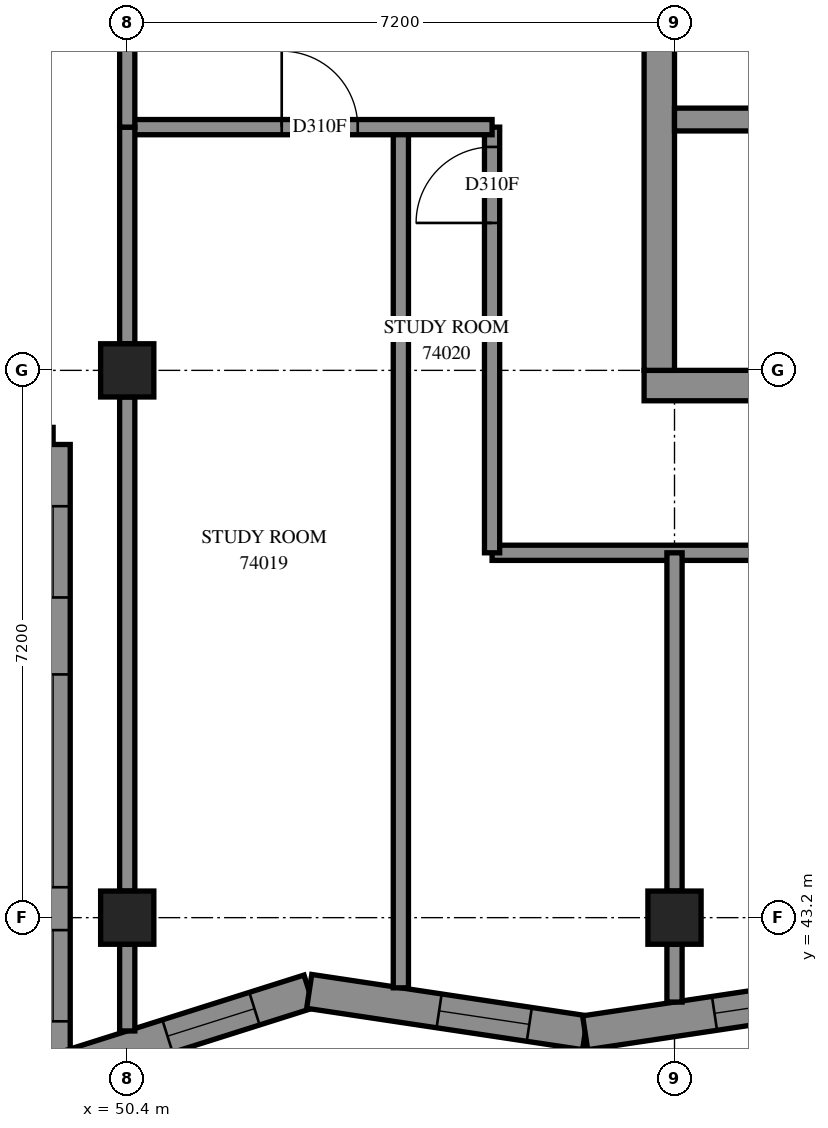
"""IFC4 building model, lengths in metres.
Left out: names, types, materials, properties, quantities, classifications, styles, units other than length and angle.
Written with IfcOpenShell. Run it as: python <this file> out.ifc"""

import sys

from ifc_helpers import new_model, si_unit, direction, frame, frame_2d, origin, origin_2d, place, context, subcontext, project, spatial, polyline, rectangle, outline, extrude, element, fill, save


model = new_model("IFC4")
c1 = context("Model", 3, precision=1e-05, world=origin(), true_north=direction((0.0, 1.0)))
c2 = subcontext(c1, "Body", "Model", "MODEL_VIEW")
j1 = project(units=[si_unit("LENGTHUNIT", "METRE"), si_unit("PLANEANGLEUNIT", "RADIAN")], contexts=[c1])
p1 = place(None, origin())
s1 = spatial("IfcSite", under=j1, at=p1, CompositionType="ELEMENT")
p2 = place(p1, origin())
s2 = spatial("IfcBuilding", under=s1, at=p2, CompositionType="ELEMENT")
p3 = place(p2, frame((0.0, 0.0, 271.0)))
s3 = spatial("IfcBuildingStorey", under=s2, at=p3, CompositionType="ELEMENT", Elevation=271.0)
for number, where, z_axis, x_axis in (
    (1, (50.4, 43.2, 0.0), (0.0, 0.0, 1.0), (1.0, 0.0, 0.0)),
    (2, (50.4, 50.4, 0.0), (0.0, 0.0, 1.0), (1.0, 0.0, 0.0)),
    (3, (57.6, 43.2, 0.0), (0.0, 0.0, 1.0), (1.0, 0.0, 0.0)),
):
    element("IfcColumn", number, at=place(p3, frame(where, z_axis=z_axis, x_axis=x_axis)), inside=s3, PredefinedType="COLUMN", context=c2, shape_type="SweptSolid", body=[
        extrude(rectangle(XDim=0.7, YDim=0.7, at=origin_2d()), origin(), (0.0, 0.0, 1.0), 3.1),
    ])
p4 = place(p3, frame((57.2, 50.2, -0.3), z_axis=(0.0, 0.0, 1.0), x_axis=(1.0, 0.0, 0.0)))
e4 = element("IfcWall", 4, at=p4, inside=s3, PredefinedType="SHEAR", context=c2, shape_type="SweptSolid", body=[
    extrude(rectangle(XDim=15.2, YDim=0.4, at=frame_2d((7.6, 0.0))), origin(), (0.0, 0.0, 1.0), 2.7),
])
p5 = place(p3, frame((57.4, 50.4, -0.3), z_axis=(0.0, 0.0, 1.0), x_axis=(0.0, 1.0, 0.0)))
e5 = element("IfcWall", 5, at=p5, inside=s3, PredefinedType="SHEAR", context=c2, shape_type="SweptSolid", body=[
    extrude(rectangle(XDim=14.4, YDim=0.4, at=frame_2d((7.2, 0.0))), origin(), (0.0, 0.0, 1.0), 2.7),
])
p6 = place(p5, frame((4.55, 0.0, 0.3)))
e6 = element("IfcOpeningElement", 6, at=p6, cuts=e5, PredefinedType="OPENING", context=c2, shape_type="SweptSolid", body=[
    extrude(rectangle(XDim=1.1, YDim=2.1, at=frame_2d((0.55, 1.05))), frame((0.0, 0.21, 0.0), z_axis=(0.0, -1.0, 0.0), x_axis=(1.0, 0.0, 0.0)), (0.0, 0.0, 1.0), 0.42),
])
p7 = place(p5, frame((11.35, 0.0, 0.3)))
e7 = element("IfcOpeningElement", 7, at=p7, cuts=e5, PredefinedType="OPENING", context=c2, shape_type="SweptSolid", body=[
    extrude(rectangle(XDim=1.1, YDim=2.1, at=frame_2d((0.55, 1.05))), frame((0.0, 0.21, 0.0), z_axis=(0.0, -1.0, 0.0), x_axis=(1.0, 0.0, 0.0)), (0.0, 0.0, 1.0), 0.42),
])
p8 = place(p3, frame((57.6, 53.7, 0.0), z_axis=(0.0, 0.0, 1.0), x_axis=(1.0, 0.0, 0.0)))
e8 = element("IfcWall", 8, at=p8, inside=s3, PredefinedType="SOLIDWALL", context=c2, shape_type="SweptSolid", body=[
    extrude(rectangle(XDim=14.4, YDim=0.3, at=frame_2d((7.2, 0.0))), origin(), (0.0, 0.0, 1.0), 3.1),
])
p9 = place(p8, frame((1.35, 0.0, 0.0)))
e9 = element("IfcOpeningElement", 9, at=p9, cuts=e8, PredefinedType="OPENING", context=c2, shape_type="SweptSolid", body=[
    extrude(rectangle(XDim=0.9, YDim=2.1, at=frame_2d((0.45, 1.05))), frame((0.0, 0.16, 0.0), z_axis=(0.0, -1.0, 0.0), x_axis=(1.0, 0.0, 0.0)), (0.0, 0.0, 1.0), 0.32),
])
p10 = place(p8, frame((4.95, 0.0, 0.0)))
e10 = element("IfcOpeningElement", 10, at=p10, cuts=e8, PredefinedType="OPENING", context=c2, shape_type="SweptSolid", body=[
    extrude(rectangle(XDim=0.9, YDim=2.1, at=frame_2d((0.45, 1.05))), frame((0.0, 0.16, 0.0), z_axis=(0.0, -1.0, 0.0), x_axis=(1.0, 0.0, 0.0)), (0.0, 0.0, 1.0), 0.32),
])
p11 = place(p8, frame((8.55, 0.0, 0.0)))
e11 = element("IfcOpeningElement", 11, at=p11, cuts=e8, PredefinedType="OPENING", context=c2, shape_type="SweptSolid", body=[
    extrude(rectangle(XDim=0.9, YDim=2.1, at=frame_2d((0.45, 1.05))), frame((0.0, 0.16, 0.0), z_axis=(0.0, -1.0, 0.0), x_axis=(1.0, 0.0, 0.0)), (0.0, 0.0, 1.0), 0.32),
])
p12 = place(p8, frame((12.05, 0.0, 0.0)))
e12 = element("IfcOpeningElement", 12, at=p12, cuts=e8, PredefinedType="OPENING", context=c2, shape_type="SweptSolid", body=[
    extrude(rectangle(XDim=1.1, YDim=2.1, at=frame_2d((0.55, 1.05))), frame((0.0, 0.16, 0.0), z_axis=(0.0, -1.0, 0.0), x_axis=(1.0, 0.0, 0.0)), (0.0, 0.0, 1.0), 0.32),
])
p13 = place(p3, frame((42.225, 49.425, 0.0), z_axis=(0.0, 0.0, 1.0), x_axis=(1.0, 0.0, 0.0)))
e13 = element("IfcWall", 13, at=p13, inside=s3, PredefinedType="SOLIDWALL", context=c2, shape_type="SweptSolid", body=[
    extrude(outline(polyline([(-0.225, -0.225), (6.975, -0.225), (7.425, 0.225), (0.225, 0.225), (-0.225, -0.225)])), origin(), (0.0, 0.0, 1.0), 3.1),
])
p14 = place(p13, frame((1.375, 0.0, 0.45)))
e14 = element("IfcOpeningElement", 14, at=p14, cuts=e13, PredefinedType="OPENING", context=c2, shape_type="SweptSolid", body=[
    extrude(rectangle(XDim=2.8, YDim=2.55, at=frame_2d((1.4, 1.275))), frame((0.0, 0.235, 0.0), z_axis=(0.0, -1.0, 0.0), x_axis=(1.0, 0.0, 0.0)), (0.0, 0.0, 1.0), 0.47),
])
p15 = place(p13, frame((5.188, 0.0, 0.45)))
e15 = element("IfcOpeningElement", 15, at=p15, cuts=e13, PredefinedType="OPENING", context=c2, shape_type="SweptSolid", body=[
    extrude(rectangle(XDim=1.2, YDim=2.55, at=frame_2d((0.6, 1.275))), frame((0.0, 0.235, 0.0), z_axis=(0.0, -1.0, 0.0), x_axis=(1.0, 0.0, 0.0)), (0.0, 0.0, 1.0), 0.47),
])
p16 = place(p3, frame((49.425, 49.425, 0.0), z_axis=(0.0, 0.0, 1.0), x_axis=(0.0, -1.0, 0.0)))
e16 = element("IfcWall", 16, at=p16, inside=s3, PredefinedType="SOLIDWALL", context=c2, shape_type="SweptSolid", body=[
    extrude(outline(polyline([(0.225, -0.225), (8.567, -0.225), (7.953, 0.225), (-0.225, 0.225), (0.225, -0.225)])), origin(), (0.0, 0.0, 1.0), 3.1),
])
p17 = place(p16, frame((3.025, 0.0, 0.45)))
e17 = element("IfcOpeningElement", 17, at=p17, cuts=e16, PredefinedType="OPENING", context=c2, shape_type="SweptSolid", body=[
    extrude(rectangle(XDim=2.8, YDim=2.55, at=frame_2d((1.4, 1.275))), frame((0.0, 0.235, 0.0), z_axis=(0.0, -1.0, 0.0), x_axis=(1.0, 0.0, 0.0)), (0.0, 0.0, 1.0), 0.47),
])
p18 = place(p16, frame((0.812, 0.0, 0.45)))
e18 = element("IfcOpeningElement", 18, at=p18, cuts=e16, PredefinedType="OPENING", context=c2, shape_type="SweptSolid", body=[
    extrude(rectangle(XDim=1.2, YDim=2.55, at=frame_2d((0.6, 1.275))), frame((0.0, 0.235, 0.0), z_axis=(0.0, -1.0, 0.0), x_axis=(1.0, 0.0, 0.0)), (0.0, 0.0, 1.0), 0.47),
])
p19 = place(p16, frame((6.389, 0.0, 0.45)))
e19 = element("IfcOpeningElement", 19, at=p19, cuts=e16, PredefinedType="OPENING", context=c2, shape_type="SweptSolid", body=[
    extrude(rectangle(XDim=1.2, YDim=2.55, at=frame_2d((0.6, 1.275))), frame((0.0, 0.235, 0.0), z_axis=(0.0, -1.0, 0.0), x_axis=(1.0, 0.0, 0.0)), (0.0, 0.0, 1.0), 0.47),
])
p20 = place(p3, frame((49.425, 41.165, 0.0), z_axis=(0.0, 0.0, 1.0), x_axis=(0.9534872353, 0.3014333959, 0.0)))
e20 = element("IfcWall", 20, at=p20, inside=s3, PredefinedType="SOLIDWALL", context=c2, shape_type="SweptSolid", body=[
    extrude(outline(polyline([(-0.307, -0.225), (3.481, -0.225), (3.586, 0.225), (0.307, 0.225), (-0.307, -0.225)])), origin(), (0.0, 0.0, 1.0), 3.1),
])
p21 = place(p20, frame((1.578, 0.0, 0.45)))
e21 = element("IfcOpeningElement", 21, at=p21, cuts=e20, PredefinedType="OPENING", context=c2, shape_type="SweptSolid", body=[
    extrude(rectangle(XDim=1.2, YDim=2.55, at=frame_2d((0.6, 1.275))), frame((0.0, 0.235, 0.0), z_axis=(0.0, -1.0, 0.0), x_axis=(1.0, 0.0, 0.0)), (0.0, 0.0, 1.0), 0.47),
])
p22 = place(p3, frame((52.794, 42.23, 0.0), z_axis=(0.0, 0.0, 1.0), x_axis=(0.9889307576, -0.14837775, 0.0)))
e22 = element("IfcWall", 22, at=p22, inside=s3, PredefinedType="SOLIDWALL", context=c2, shape_type="SweptSolid", body=[
    extrude(outline(polyline([(0.052, -0.225), (3.705, -0.225), (3.637, 0.225), (-0.052, 0.225), (0.052, -0.225)])), origin(), (0.0, 0.0, 1.0), 3.1),
])
p23 = place(p22, frame((1.728, 0.0, 0.45)))
e23 = element("IfcOpeningElement", 23, at=p23, cuts=e22, PredefinedType="OPENING", context=c2, shape_type="SweptSolid", body=[
    extrude(rectangle(XDim=1.2, YDim=2.55, at=frame_2d((0.6, 1.275))), frame((0.0, 0.235, 0.0), z_axis=(0.0, -1.0, 0.0), x_axis=(1.0, 0.0, 0.0)), (0.0, 0.0, 1.0), 0.47),
])
p24 = place(p3, frame((56.425, 41.685, 0.0), z_axis=(0.0, 0.0, 1.0), x_axis=(0.9889295242, 0.1483859704, 0.0)))
e24 = element("IfcWall", 24, at=p24, inside=s3, PredefinedType="SOLIDWALL", context=c2, shape_type="SweptSolid", body=[
    extrude(outline(polyline([(-0.034, -0.225), (3.619, -0.225), (3.686, 0.225), (0.034, 0.225), (-0.034, -0.225)])), origin(), (0.0, 0.0, 1.0), 3.1),
])
p25 = place(p24, frame((1.721, 0.0, 0.45)))
e25 = element("IfcOpeningElement", 25, at=p25, cuts=e24, PredefinedType="OPENING", context=c2, shape_type="SweptSolid", body=[
    extrude(rectangle(XDim=1.2, YDim=2.55, at=frame_2d((0.6, 1.275))), frame((0.0, 0.235, 0.0), z_axis=(0.0, -1.0, 0.0), x_axis=(1.0, 0.0, 0.0)), (0.0, 0.0, 1.0), 0.47),
])
p26 = place(p3, frame((55.2, 48.0, 0.0), z_axis=(0.0, 0.0, 1.0), x_axis=(1.0, 0.0, 0.0)))
e26 = element("IfcWall", 26, at=p26, inside=s3, PredefinedType="PARTITIONING", context=c2, shape_type="SweptSolid", body=[
    extrude(rectangle(XDim=19.15, YDim=0.2, at=frame_2d((9.575, 0.0))), origin(), (0.0, 0.0, 1.0), 3.1),
])
p27 = place(p26, frame((4.433, 0.0, 0.0)))
e27 = element("IfcOpeningElement", 27, at=p27, cuts=e26, PredefinedType="OPENING", context=c2, shape_type="SweptSolid", body=[
    extrude(rectangle(XDim=1.0, YDim=2.1, at=frame_2d((0.5, 1.05))), frame((0.0, 0.11, 0.0), z_axis=(0.0, -1.0, 0.0), x_axis=(1.0, 0.0, 0.0)), (0.0, 0.0, 1.0), 0.22),
])
p28 = place(p26, frame((6.508, 0.0, 0.0)))
e28 = element("IfcOpeningElement", 28, at=p28, cuts=e26, PredefinedType="OPENING", context=c2, shape_type="SweptSolid", body=[
    extrude(rectangle(XDim=1.0, YDim=2.1, at=frame_2d((0.5, 1.05))), frame((0.0, 0.11, 0.0), z_axis=(0.0, -1.0, 0.0), x_axis=(1.0, 0.0, 0.0)), (0.0, 0.0, 1.0), 0.22),
])
p29 = place(p26, frame((13.499, 0.0, 0.0)))
e29 = element("IfcOpeningElement", 29, at=p29, cuts=e26, PredefinedType="OPENING", context=c2, shape_type="SweptSolid", body=[
    extrude(rectangle(XDim=0.9, YDim=2.1, at=frame_2d((0.45, 1.05))), frame((0.0, 0.11, 0.0), z_axis=(0.0, -1.0, 0.0), x_axis=(1.0, 0.0, 0.0)), (0.0, 0.0, 1.0), 0.22),
])
p30 = place(p3, frame((54.0, 42.277, 0.0), z_axis=(0.0, 0.0, 1.0), x_axis=(0.0, 1.0, 0.0)))
e30 = element("IfcWall", 30, at=p30, inside=s3, PredefinedType="PARTITIONING", context=c2, shape_type="SweptSolid", body=[
    extrude(rectangle(XDim=11.323, YDim=0.2, at=frame_2d((5.662, 0.0))), origin(), (0.0, 0.0, 1.0), 3.1),
])
p31 = place(p3, frame((50.4, 43.55, 0.0), z_axis=(0.0, 0.0, 1.0), x_axis=(0.0, 1.0, 0.0)))
e31 = element("IfcWall", 31, at=p31, inside=s3, PredefinedType="PARTITIONING", context=c2, shape_type="SweptSolid", body=[
    extrude(rectangle(XDim=6.5, YDim=0.2, at=frame_2d((3.25, 0.0))), origin(), (0.0, 0.0, 1.0), 2.6),
])
p32 = place(p3, frame((55.2, 48.0, 0.0), z_axis=(0.0, 0.0, 1.0), x_axis=(0.0, 1.0, 0.0)))
e32 = element("IfcWall", 32, at=p32, inside=s3, PredefinedType="PARTITIONING", context=c2, shape_type="SweptSolid", body=[
    extrude(rectangle(XDim=5.6, YDim=0.2, at=frame_2d((2.8, 0.0))), origin(), (0.0, 0.0, 1.0), 3.1),
])
p33 = place(p32, frame((4.34, 0.0, 0.0)))
e33 = element("IfcOpeningElement", 33, at=p33, cuts=e32, PredefinedType="OPENING", context=c2, shape_type="SweptSolid", body=[
    extrude(rectangle(XDim=1.0, YDim=2.1, at=frame_2d((0.5, 1.05))), frame((0.0, 0.11, 0.0), z_axis=(0.0, -1.0, 0.0), x_axis=(1.0, 0.0, 0.0)), (0.0, 0.0, 1.0), 0.22),
])
p34 = place(p3, frame((50.4, 53.6, 0.0), z_axis=(0.0, 0.0, 1.0), x_axis=(1.0, 0.0, 0.0)))
e34 = element("IfcWall", 34, at=p34, inside=s3, PredefinedType="PARTITIONING", context=c2, shape_type="SweptSolid", body=[
    extrude(rectangle(XDim=4.8, YDim=0.2, at=frame_2d((2.4, 0.0))), origin(), (0.0, 0.0, 1.0), 3.1),
])
p35 = place(p34, frame((2.033, 0.0, 0.0)))
e35 = element("IfcOpeningElement", 35, at=p35, cuts=e34, PredefinedType="OPENING", context=c2, shape_type="SweptSolid", body=[
    extrude(rectangle(XDim=1.0, YDim=2.1, at=frame_2d((0.5, 1.05))), frame((0.0, 0.11, 0.0), z_axis=(0.0, -1.0, 0.0), x_axis=(1.0, 0.0, 0.0)), (0.0, 0.0, 1.0), 0.22),
])
p36 = place(p3, frame((57.6, 43.55, 0.0), z_axis=(0.0, 0.0, 1.0), x_axis=(0.0, 1.0, 0.0)))
e36 = element("IfcWall", 36, at=p36, inside=s3, PredefinedType="PARTITIONING", context=c2, shape_type="SweptSolid", body=[
    extrude(rectangle(XDim=4.45, YDim=0.2, at=frame_2d((2.225, 0.0))), origin(), (0.0, 0.0, 1.0), 3.1),
])
p37 = place(p3, frame((50.4, 50.75, 0.0), z_axis=(0.0, 0.0, 1.0), x_axis=(0.0, 1.0, 0.0)))
e37 = element("IfcWall", 37, at=p37, inside=s3, PredefinedType="PARTITIONING", context=c2, shape_type="SweptSolid", body=[
    extrude(rectangle(XDim=2.85, YDim=0.2, at=frame_2d((1.425, 0.0))), origin(), (0.0, 0.0, 1.0), 3.1),
])
p38 = place(p3, frame((50.4, 53.6, 0.0), z_axis=(0.0, 0.0, 1.0), x_axis=(0.0, 1.0, 0.0)))
e38 = element("IfcWall", 38, at=p38, inside=s3, PredefinedType="PARTITIONING", context=c2, shape_type="SweptSolid", body=[
    extrude(rectangle(XDim=2.0, YDim=0.2, at=frame_2d((1.0, 0.0))), origin(), (0.0, 0.0, 1.0), 3.1),
])
p39 = place(p3, frame((50.4, 41.709, 0.0), z_axis=(0.0, 0.0, 1.0), x_axis=(0.0, 1.0, 0.0)))
e39 = element("IfcWall", 39, at=p39, inside=s3, PredefinedType="PARTITIONING", context=c2, shape_type="SweptSolid", body=[
    extrude(rectangle(XDim=1.141, YDim=0.2, at=frame_2d((0.57, 0.0))), origin(), (0.0, 0.0, 1.0), 3.1),
])
p40 = place(p3, frame((57.6, 42.089, 0.0), z_axis=(0.0, 0.0, 1.0), x_axis=(0.0, 1.0, 0.0)))
e40 = element("IfcWall", 40, at=p40, inside=s3, PredefinedType="PARTITIONING", context=c2, shape_type="SweptSolid", body=[
    extrude(rectangle(XDim=0.761, YDim=0.2, at=frame_2d((0.38, 0.0))), origin(), (0.0, 0.0, 1.0), 3.1),
])
p41 = place(p17, origin())
e41 = element("IfcWindow", 41, at=p41, inside=s3, PartitioningType="SINGLE_PANEL", PredefinedType="WINDOW", context=c2, shape_type="SweptSolid", body=[
    extrude(rectangle(XDim=2.8, YDim=2.55, at=frame_2d((1.4, 1.275))), frame((0.0, 0.205, 0.0), z_axis=(0.0, -1.0, 0.0), x_axis=(1.0, 0.0, 0.0)), (0.0, 0.0, 1.0), 0.06),
])
fill(e17, e41)
p42 = place(p18, origin())
e42 = element("IfcWindow", 42, at=p42, inside=s3, PartitioningType="SINGLE_PANEL", PredefinedType="WINDOW", context=c2, shape_type="SweptSolid", body=[
    extrude(rectangle(XDim=1.2, YDim=2.55, at=frame_2d((0.6, 1.275))), frame((0.0, 0.205, 0.0), z_axis=(0.0, -1.0, 0.0), x_axis=(1.0, 0.0, 0.0)), (0.0, 0.0, 1.0), 0.06),
])
fill(e18, e42)
p43 = place(p19, origin())
e43 = element("IfcWindow", 43, at=p43, inside=s3, PartitioningType="SINGLE_PANEL", PredefinedType="WINDOW", context=c2, shape_type="SweptSolid", body=[
    extrude(rectangle(XDim=1.2, YDim=2.55, at=frame_2d((0.6, 1.275))), frame((0.0, 0.205, 0.0), z_axis=(0.0, -1.0, 0.0), x_axis=(1.0, 0.0, 0.0)), (0.0, 0.0, 1.0), 0.06),
])
fill(e19, e43)
p44 = place(p21, origin())
e44 = element("IfcWindow", 44, at=p44, inside=s3, PartitioningType="SINGLE_PANEL", PredefinedType="WINDOW", context=c2, shape_type="SweptSolid", body=[
    extrude(rectangle(XDim=1.2, YDim=2.55, at=frame_2d((0.6, 1.275))), frame((0.0, 0.205, 0.0), z_axis=(0.0, -1.0, 0.0), x_axis=(1.0, 0.0, 0.0)), (0.0, 0.0, 1.0), 0.06),
])
fill(e21, e44)
p45 = place(p23, origin())
e45 = element("IfcWindow", 45, at=p45, inside=s3, PartitioningType="SINGLE_PANEL", PredefinedType="WINDOW", context=c2, shape_type="SweptSolid", body=[
    extrude(rectangle(XDim=1.2, YDim=2.55, at=frame_2d((0.6, 1.275))), frame((0.0, 0.205, 0.0), z_axis=(0.0, -1.0, 0.0), x_axis=(1.0, 0.0, 0.0)), (0.0, 0.0, 1.0), 0.06),
])
fill(e23, e45)
p46 = place(p25, origin())
e46 = element("IfcWindow", 46, at=p46, inside=s3, PartitioningType="SINGLE_PANEL", PredefinedType="WINDOW", context=c2, shape_type="SweptSolid", body=[
    extrude(rectangle(XDim=1.2, YDim=2.55, at=frame_2d((0.6, 1.275))), frame((0.0, 0.205, 0.0), z_axis=(0.0, -1.0, 0.0), x_axis=(1.0, 0.0, 0.0)), (0.0, 0.0, 1.0), 0.06),
])
fill(e25, e46)
p47 = place(p35, origin())
e47 = element("IfcDoor", 47, at=p47, inside=s3, OperationType="SINGLE_SWING_LEFT", PredefinedType="DOOR", context=c2, shape_type="SweptSolid", body=[
    extrude(rectangle(XDim=1.0, YDim=2.1, at=frame_2d((0.5, 1.05))), frame((0.0, 0.025, 0.0), z_axis=(0.0, -1.0, 0.0), x_axis=(1.0, 0.0, 0.0)), (0.0, 0.0, 1.0), 0.05),
])
fill(e35, e47)
p48 = place(p33, origin())
e48 = element("IfcDoor", 48, at=p48, inside=s3, OperationType="SINGLE_SWING_RIGHT", PredefinedType="DOOR", context=c2, shape_type="SweptSolid", body=[
    extrude(rectangle(XDim=1.0, YDim=2.1, at=frame_2d((0.5, 1.05))), frame((0.0, 0.025, 0.0), z_axis=(0.0, -1.0, 0.0), x_axis=(1.0, 0.0, 0.0)), (0.0, 0.0, 1.0), 0.05),
])
fill(e33, e48)
save(model, sys.argv[1])
